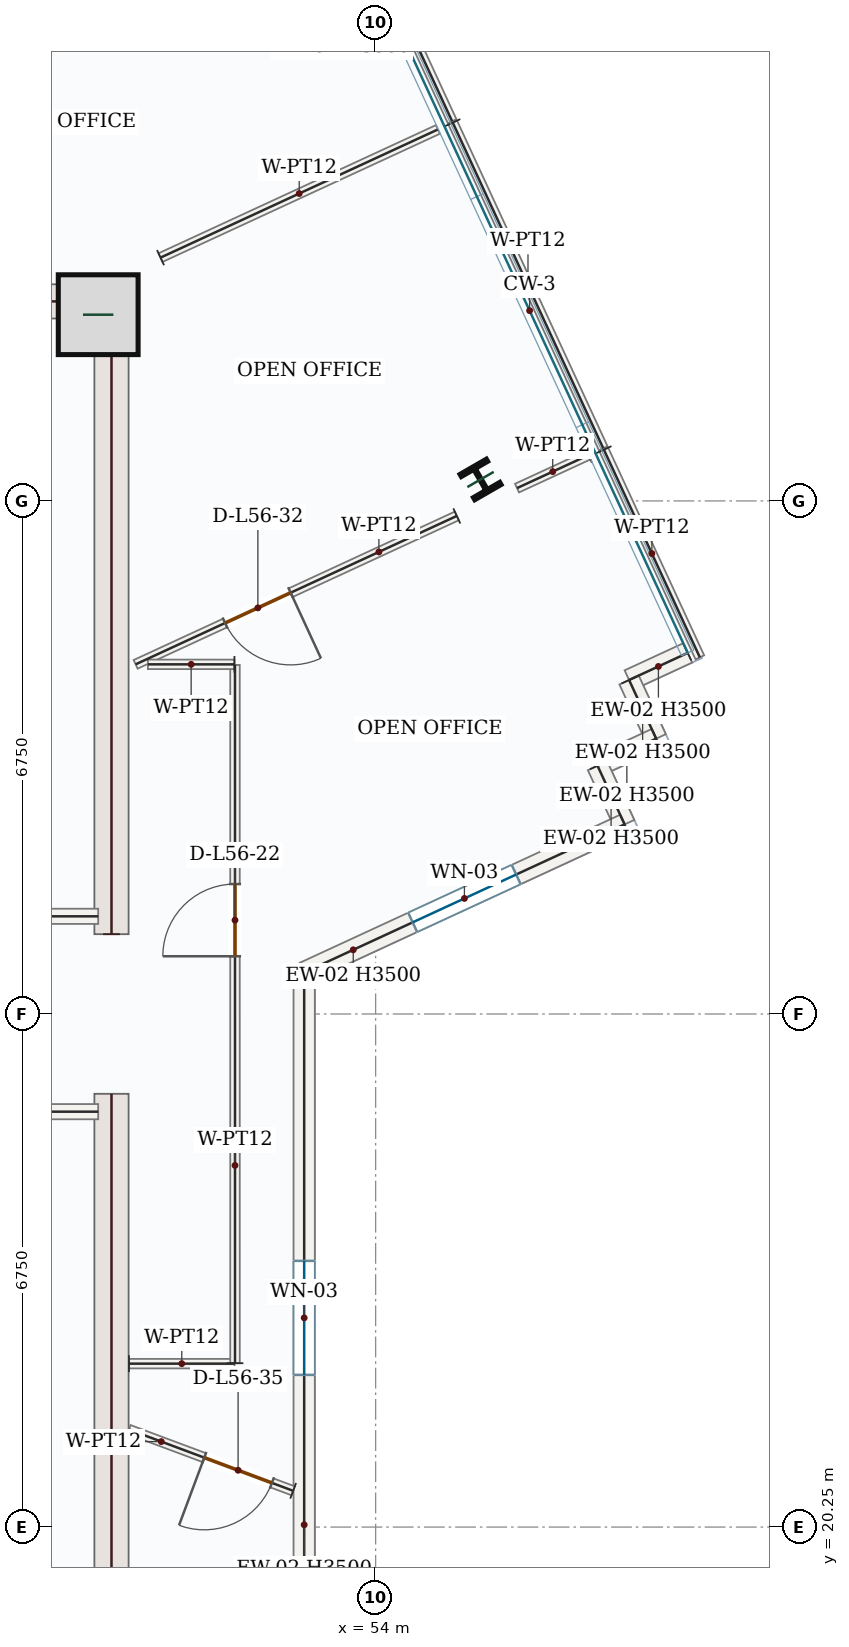
"""IFC4 building model, lengths in metres.
Left out: names, types, materials, properties, quantities, classifications, styles, units other than length and angle.
Written with IfcOpenShell. Run it as: python <this file> out.ifc"""

import sys

from ifc_helpers import new_model, si_unit, direction, frame, frame_2d, origin, origin_2d, place, context, subcontext, project, spatial, rectangle, i_section, extrude, source, transform, mapped, element, fill, save


model = new_model("IFC4")
c1 = context("Model", 3, precision=1e-05, world=origin(), true_north=direction((0.0, 1.0)))
c2 = subcontext(c1, "Body", "Model", "MODEL_VIEW")
j1 = project(units=[si_unit("LENGTHUNIT", "METRE"), si_unit("PLANEANGLEUNIT", "RADIAN")], contexts=[c1])
p1 = place(None, origin())
s1 = spatial("IfcSite", under=j1, at=p1, CompositionType="ELEMENT")
p2 = place(p1, origin())
s2 = spatial("IfcBuilding", under=s1, at=p2, CompositionType="ELEMENT")
p3 = place(p2, frame((0.0, 0.0, 239.1)))
s3 = spatial("IfcBuildingStorey", under=s2, at=p3, CompositionType="ELEMENT", Elevation=239.1)
m1 = source(origin(), c2, "Body", "SweptSolid", [
    extrude(rectangle(XDim=8.55, YDim=0.45, at=frame_2d((4.275, 0.0))), origin(), (0.0, 0.0, 1.0), 3.5),
])
for number, where, z_axis, x_axis in (
    (1, (50.525, 17.4, 0.0), (0.0, 0.0, 1.0), (0.0, 1.0, 0.0)),
    (2, (50.525, 28.05, 0.0), (0.0, 0.0, 1.0), (0.0, 1.0, 0.0)),
):
    element("IfcWall", number, at=place(p3, frame(where, z_axis=z_axis, x_axis=x_axis)), inside=s3, PredefinedType="SHEAR", context=c2, shape_type="MappedRepresentation", body=[
        mapped(m1, transform((0.0, 0.0, 0.0), x_axis=(1.0, 0.0, 0.0), y_axis=(0.0, 1.0, 0.0), z_axis=(0.0, 0.0, 1.0), scale=1.0)),
    ])
m2 = source(origin(), c2, "Body", "SweptSolid", [
    extrude(rectangle(XDim=7.1, YDim=0.45, at=frame_2d((3.55, 0.0))), origin(), (0.0, 0.0, 1.0), 3.5),
])
p4 = place(p3, frame((43.2, 36.375, 0.0), z_axis=(0.0, 0.0, 1.0), x_axis=(1.0, 0.0, 0.0)))
e3 = element("IfcWall", 3, at=p4, inside=s3, PredefinedType="SHEAR", context=c2, shape_type="MappedRepresentation", body=[
    mapped(m2, transform((0.0, 0.0, 0.0), x_axis=(1.0, 0.0, 0.0), y_axis=(0.0, 1.0, 0.0), z_axis=(0.0, 0.0, 1.0), scale=1.0)),
])
m3 = source(origin(), c2, "Body", "SweptSolid", [
    extrude(rectangle(XDim=1.05, YDim=1.05, at=origin_2d()), origin(), (0.0, 0.0, 1.0), 3.75),
])
p5 = place(p3, frame((50.35, 36.2, 0.0), z_axis=(0.0, 0.0, 1.0), x_axis=(1.0, 0.0, 0.0)))
e4 = element("IfcColumn", 4, at=p5, inside=s3, PredefinedType="COLUMN", context=c2, shape_type="MappedRepresentation", body=[
    mapped(m3, transform((0.0, 0.0, 0.0), x_axis=(1.0, 0.0, 0.0), y_axis=(0.0, 1.0, 0.0), z_axis=(0.0, 0.0, 1.0), scale=1.0)),
])
m4 = source(origin(), c2, "Body", "SweptSolid", [
    extrude(i_section(OverallWidth=0.399, OverallDepth=0.386, WebThickness=0.021, FlangeThickness=0.033, FilletRadius=0.018, at=origin_2d()), origin(), (0.0, 0.0, 1.0), 3.75),
])
p6 = place(p3, frame((55.38, 34.032, 0.0), z_axis=(0.0, 0.0, 1.0), x_axis=(0.866025403784, 0.5, 0.0)))
e5 = element("IfcColumn", 5, at=p6, inside=s3, PredefinedType="COLUMN", context=c2, shape_type="MappedRepresentation", body=[
    mapped(m4, transform((0.0, 0.0, 0.0), x_axis=(1.0, 0.0, 0.0), y_axis=(0.0, 1.0, 0.0), z_axis=(0.0, 0.0, 1.0), scale=1.0)),
])
p7 = place(p3, frame((46.655, 39.26, 0.0), z_axis=(0.0, 0.0, 1.0), x_axis=(0.907767275269, 0.419474163627, 0.0)))
e6 = element("IfcWall", 6, at=p7, inside=s3, PredefinedType="SOLIDWALL", context=c2, shape_type="SweptSolid", body=[
    extrude(rectangle(XDim=5.545, YDim=0.28, at=frame_2d((2.772, 0.0))), origin(), (0.0, 0.0, 1.0), 3.5),
])
p8 = place(p7, frame((2.022, 0.0, 0.85)))
e7 = element("IfcOpeningElement", 7, at=p8, cuts=e6, PredefinedType="OPENING", context=c2, shape_type="SweptSolid", body=[
    extrude(rectangle(XDim=1.5, YDim=1.5, at=frame_2d((0.75, 0.75))), frame((0.0, 0.15, 0.0), z_axis=(0.0, -1.0, 0.0), x_axis=(1.0, 0.0, 0.0)), (0.0, 0.0, 1.0), 0.3),
])
m5 = source(origin(), c2, "Body", "SweptSolid", [
    extrude(rectangle(XDim=0.85, YDim=0.28, at=frame_2d((0.425, 0.0))), origin(), (0.0, 0.0, 1.0), 3.5),
])
for number, where, z_axis, x_axis in (
    (8, (58.106, 31.75, 0.0), (0.0, 0.0, 1.0), (-0.908, -0.419, 0.0)),
    (9, (57.334, 31.394, 0.0), (0.0, 0.0, 1.0), (0.419, -0.908, 0.0)),
):
    element("IfcWall", number, at=place(p3, frame(where, z_axis=z_axis, x_axis=x_axis)), inside=s3, PredefinedType="SOLIDWALL", context=c2, shape_type="MappedRepresentation", body=[
        mapped(m5, transform((0.0, 0.0, 0.0), x_axis=(1.0, 0.0, 0.0), y_axis=(0.0, 1.0, 0.0), z_axis=(0.0, 0.0, 1.0), scale=1.0)),
    ])
m6 = source(origin(), c2, "Body", "SweptSolid", [
    extrude(rectangle(XDim=0.85, YDim=0.28, at=frame_2d((0.425, 0.0))), origin(), (0.0, 0.0, 1.0), 3.5),
])
for number, where, z_axis, x_axis in (
    (10, (57.691, 30.622, 0.0), (0.0, 0.0, 1.0), (-0.908, -0.419, 0.0)),
    (11, (56.919, 30.266, 0.0), (0.0, 0.0, 1.0), (0.419, -0.908, 0.0)),
):
    element("IfcWall", number, at=place(p3, frame(where, z_axis=z_axis, x_axis=x_axis)), inside=s3, PredefinedType="SOLIDWALL", context=c2, shape_type="MappedRepresentation", body=[
        mapped(m6, transform((0.0, 0.0, 0.0), x_axis=(1.0, 0.0, 0.0), y_axis=(0.0, 1.0, 0.0), z_axis=(0.0, 0.0, 1.0), scale=1.0)),
    ])
p9 = place(p3, frame((57.276, 29.494, 0.0), z_axis=(0.0, 0.0, 1.0), x_axis=(-0.907756183213, -0.419498166669, 0.0)))
e12 = element("IfcWall", 12, at=p9, inside=s3, PredefinedType="SOLIDWALL", context=c2, shape_type="SweptSolid", body=[
    extrude(rectangle(XDim=4.644, YDim=0.28, at=frame_2d((2.322, 0.0))), origin(), (0.0, 0.0, 1.0), 3.5),
])
p10 = place(p9, frame((1.572, 0.0, 0.85)))
e13 = element("IfcOpeningElement", 13, at=p10, cuts=e12, PredefinedType="OPENING", context=c2, shape_type="SweptSolid", body=[
    extrude(rectangle(XDim=1.5, YDim=1.5, at=frame_2d((0.75, 0.75))), frame((0.0, 0.15, 0.0), z_axis=(0.0, -1.0, 0.0), x_axis=(1.0, 0.0, 0.0)), (0.0, 0.0, 1.0), 0.3),
])
p11 = place(p3, frame((53.06, 27.546, 0.0), z_axis=(0.0, 0.0, 1.0), x_axis=(0.0, -1.0, 0.0)))
e14 = element("IfcWall", 14, at=p11, inside=s3, PredefinedType="SOLIDWALL", context=c2, shape_type="SweptSolid", body=[
    extrude(rectangle(XDim=9.088, YDim=0.28, at=frame_2d((4.544, 0.0))), origin(), (0.0, 0.0, 1.0), 3.5),
])
p12 = place(p11, frame((3.794, 0.0, 0.85)))
e15 = element("IfcOpeningElement", 15, at=p12, cuts=e14, PredefinedType="OPENING", context=c2, shape_type="SweptSolid", body=[
    extrude(rectangle(XDim=1.5, YDim=1.5, at=frame_2d((0.75, 0.75))), frame((0.0, 0.15, 0.0), z_axis=(0.0, -1.0, 0.0), x_axis=(1.0, 0.0, 0.0)), (0.0, 0.0, 1.0), 0.3),
])
m7 = source(origin(), c2, "Body", "SweptSolid", [
    extrude(rectangle(XDim=4.25, YDim=0.2, at=frame_2d((2.125, 0.0))), origin(), (0.0, 0.0, 1.0), 3.5),
])
for number, where, z_axis, x_axis in (
    (16, (46.1, 25.715, 0.0), (0.0, 0.0, 1.0), (1.0, 0.0, 0.0)),
    (17, (46.1, 28.285, 0.0), (0.0, 0.0, 1.0), (1.0, 0.0, 0.0)),
):
    element("IfcWall", number, at=place(p3, frame(where, z_axis=z_axis, x_axis=x_axis)), inside=s3, PredefinedType="SOLIDWALL", context=c2, shape_type="MappedRepresentation", body=[
        mapped(m7, transform((0.0, 0.0, 0.0), x_axis=(1.0, 0.0, 0.0), y_axis=(0.0, 1.0, 0.0), z_axis=(0.0, 0.0, 1.0), scale=1.0)),
    ])
m8 = source(origin(), c2, "Body", "SweptSolid", [
    extrude(rectangle(XDim=4.02, YDim=0.125, at=frame_2d((2.01, 0.0))), origin(), (0.0, 0.0, 1.0), 3.5),
])
p13 = place(p3, frame((51.17, 36.951, 0.0), z_axis=(0.0, 0.0, 1.0), x_axis=(0.907776222313, 0.419454801145, 0.0)))
e18 = element("IfcWall", 18, at=p13, inside=s3, PredefinedType="PARTITIONING", context=c2, shape_type="MappedRepresentation", body=[
    mapped(m8, transform((0.0, 0.0, 0.0), x_axis=(1.0, 0.0, 0.0), y_axis=(0.0, 1.0, 0.0), z_axis=(0.0, 0.0, 1.0), scale=1.0)),
])
m9 = source(origin(), c2, "Body", "SweptSolid", [
    extrude(rectangle(XDim=4.72, YDim=0.125, at=frame_2d((2.36, 0.0))), origin(), (0.0, 0.0, 1.0), 3.5),
])
p14 = place(p3, frame((55.015, 38.727, 0.0), z_axis=(0.0, 0.0, 1.0), x_axis=(0.419422223592, -0.907791274665, 0.0)))
e19 = element("IfcWall", 19, at=p14, inside=s3, PredefinedType="PARTITIONING", context=c2, shape_type="MappedRepresentation", body=[
    mapped(m9, transform((0.0, 0.0, 0.0), x_axis=(1.0, 0.0, 0.0), y_axis=(0.0, 1.0, 0.0), z_axis=(0.0, 0.0, 1.0), scale=1.0)),
])
m10 = source(origin(), c2, "Body", "SweptSolid", [
    extrude(rectangle(XDim=1.034, YDim=0.125, at=frame_2d((0.517, 0.0))), origin(), (0.0, 0.0, 1.0), 3.5),
])
p15 = place(p3, frame((56.799, 34.352, 0.0), z_axis=(0.0, 0.0, 1.0), x_axis=(-0.907786599617, -0.419432342049, 0.0)))
e20 = element("IfcWall", 20, at=p15, inside=s3, PredefinedType="PARTITIONING", context=c2, shape_type="MappedRepresentation", body=[
    mapped(m10, transform((0.0, 0.0, 0.0), x_axis=(1.0, 0.0, 0.0), y_axis=(0.0, 1.0, 0.0), z_axis=(0.0, 0.0, 1.0), scale=1.0)),
])
p16 = place(p3, frame((55.068, 33.552, 0.0), z_axis=(0.0, 0.0, 1.0), x_axis=(-0.90779658515, -0.419410729465, 0.0)))
e21 = element("IfcWall", 21, at=p16, inside=s3, PredefinedType="PARTITIONING", context=c2, shape_type="SweptSolid", body=[
    extrude(rectangle(XDim=4.655, YDim=0.125, at=frame_2d((2.327, 0.0))), origin(), (0.0, 0.0, 1.0), 3.5),
])
p17 = place(p16, frame((2.408, 0.0, 0.0)))
e22 = element("IfcOpeningElement", 22, at=p17, cuts=e21, PredefinedType="OPENING", context=c2, shape_type="SweptSolid", body=[
    extrude(rectangle(XDim=0.95, YDim=2.15, at=frame_2d((0.475, 1.075))), frame((0.0, 0.073, 0.0), z_axis=(0.0, -1.0, 0.0), x_axis=(1.0, 0.0, 0.0)), (0.0, 0.0, 1.0), 0.145),
])
m11 = source(origin(), c2, "Body", "SweptSolid", [
    extrude(rectangle(XDim=1.389, YDim=0.125, at=frame_2d((0.695, 0.0))), origin(), (0.0, 0.0, 1.0), 3.5),
])
p18 = place(p3, frame((50.755, 22.4, 0.0), z_axis=(0.0, 0.0, 1.0), x_axis=(1.0, 0.0, 0.0)))
e23 = element("IfcWall", 23, at=p18, inside=s3, PredefinedType="PARTITIONING", context=c2, shape_type="MappedRepresentation", body=[
    mapped(m11, transform((0.0, 0.0, 0.0), x_axis=(1.0, 0.0, 0.0), y_axis=(0.0, 1.0, 0.0), z_axis=(0.0, 0.0, 1.0), scale=1.0)),
])
p19 = place(p3, frame((52.15, 22.406, 0.0), z_axis=(0.0, 0.0, 1.0), x_axis=(-2.657666e-05, 0.999999999647, 0.0)))
e24 = element("IfcWall", 24, at=p19, inside=s3, PredefinedType="PARTITIONING", context=c2, shape_type="SweptSolid", body=[
    extrude(rectangle(XDim=9.186, YDim=0.125, at=frame_2d((4.593, 0.0))), origin(), (0.0, 0.0, 1.0), 3.5),
])
p20 = place(p19, frame((5.354, 0.0, 0.0)))
e25 = element("IfcOpeningElement", 25, at=p20, cuts=e24, PredefinedType="OPENING", context=c2, shape_type="SweptSolid", body=[
    extrude(rectangle(XDim=0.95, YDim=2.15, at=frame_2d((0.475, 1.075))), frame((0.0, 0.073, 0.0), z_axis=(0.0, -1.0, 0.0), x_axis=(1.0, 0.0, 0.0)), (0.0, 0.0, 1.0), 0.145),
])
m12 = source(origin(), c2, "Body", "SweptSolid", [
    extrude(rectangle(XDim=1.139, YDim=0.125, at=frame_2d((0.569, 0.0))), origin(), (0.0, 0.0, 1.0), 3.5),
])
p21 = place(p3, frame((52.142, 31.6, 0.0), z_axis=(0.0, 0.0, 1.0), x_axis=(-0.999999908058, 0.000428816427, 0.0)))
e26 = element("IfcWall", 26, at=p21, inside=s3, PredefinedType="PARTITIONING", context=c2, shape_type="MappedRepresentation", body=[
    mapped(m12, transform((0.0, 0.0, 0.0), x_axis=(1.0, 0.0, 0.0), y_axis=(0.0, 1.0, 0.0), z_axis=(0.0, 0.0, 1.0), scale=1.0)),
])
m13 = source(origin(), c2, "Body", "SweptSolid", [
    extrude(rectangle(XDim=3.01, YDim=0.125, at=frame_2d((1.505, 0.0))), origin(), (0.0, 0.0, 1.0), 3.5),
])
p22 = place(p3, frame((57.003, 34.424, 0.0), z_axis=(0.0, 0.0, 1.0), x_axis=(0.419490178077, -0.90775987491, 0.0)))
e27 = element("IfcWall", 27, at=p22, inside=s3, PredefinedType="PARTITIONING", context=c2, shape_type="MappedRepresentation", body=[
    mapped(m13, transform((0.0, 0.0, 0.0), x_axis=(1.0, 0.0, 0.0), y_axis=(0.0, 1.0, 0.0), z_axis=(0.0, 0.0, 1.0), scale=1.0)),
])
p23 = place(p3, frame((52.915, 20.727, 0.0), z_axis=(0.0, 0.0, 1.0), x_axis=(-0.936884992217, 0.349637685839, 0.0)))
e28 = element("IfcWall", 28, at=p23, inside=s3, PredefinedType="PARTITIONING", context=c2, shape_type="SweptSolid", body=[
    extrude(rectangle(XDim=2.306, YDim=0.125, at=frame_2d((1.153, 0.0))), origin(), (0.0, 0.0, 1.0), 3.5),
])
p24 = place(p23, frame((0.298, 0.0, 0.0)))
e29 = element("IfcOpeningElement", 29, at=p24, cuts=e28, PredefinedType="OPENING", context=c2, shape_type="SweptSolid", body=[
    extrude(rectangle(XDim=0.95, YDim=2.15, at=frame_2d((0.475, 1.075))), frame((0.0, 0.073, 0.0), z_axis=(0.0, -1.0, 0.0), x_axis=(1.0, 0.0, 0.0)), (0.0, 0.0, 1.0), 0.145),
])
m14 = source(origin(), c2, "Body", "SweptSolid", [
    extrude(rectangle(XDim=2.39, YDim=0.125, at=frame_2d((1.195, 0.0))), origin(), (0.0, 0.0, 1.0), 3.5),
])
p25 = place(p3, frame((54.004, 40.915, 0.0), z_axis=(0.0, 0.0, 1.0), x_axis=(0.419459790898, -0.907773916688, 0.0)))
e30 = element("IfcWall", 30, at=p25, inside=s3, PredefinedType="PARTITIONING", context=c2, shape_type="MappedRepresentation", body=[
    mapped(m14, transform((0.0, 0.0, 0.0), x_axis=(1.0, 0.0, 0.0), y_axis=(0.0, 1.0, 0.0), z_axis=(0.0, 0.0, 1.0), scale=1.0)),
])
m15 = source(origin(), c2, "Body", "SweptSolid", [
    extrude(rectangle(XDim=1.5, YDim=1.5, at=frame_2d((0.75, 0.75))), frame((0.0, 0.03, 0.0), z_axis=(0.0, -1.0, 0.0), x_axis=(1.0, 0.0, 0.0)), (0.0, 0.0, 1.0), 0.06),
])
p26 = place(p10, origin())
e31 = element("IfcWindow", 31, at=p26, inside=s3, PartitioningType="SINGLE_PANEL", PredefinedType="WINDOW", context=c2, shape_type="MappedRepresentation", body=[
    mapped(m15, transform((0.0, 0.0, 0.0), x_axis=(1.0, 0.0, 0.0), y_axis=(0.0, 1.0, 0.0), z_axis=(0.0, 0.0, 1.0), scale=1.0)),
])
fill(e13, e31)
p27 = place(p12, origin())
e32 = element("IfcWindow", 32, at=p27, inside=s3, PartitioningType="SINGLE_PANEL", PredefinedType="WINDOW", context=c2, shape_type="MappedRepresentation", body=[
    mapped(m15, transform((0.0, 0.0, 0.0), x_axis=(1.0, 0.0, 0.0), y_axis=(0.0, 1.0, 0.0), z_axis=(0.0, 0.0, 1.0), scale=1.0)),
])
fill(e15, e32)
m16 = source(origin(), c2, "Body", "SweptSolid", [
    extrude(rectangle(XDim=0.95, YDim=2.15, at=frame_2d((0.475, 1.075))), frame((0.0, 0.025, 0.0), z_axis=(0.0, -1.0, 0.0), x_axis=(1.0, 0.0, 0.0)), (0.0, 0.0, 1.0), 0.05),
])
p28 = place(p20, origin())
e33 = element("IfcDoor", 33, at=p28, inside=s3, OperationType="SINGLE_SWING_LEFT", PredefinedType="DOOR", context=c2, shape_type="MappedRepresentation", body=[
    mapped(m16, transform((0.0, 0.0, 0.0), x_axis=(1.0, 0.0, 0.0), y_axis=(0.0, 1.0, 0.0), z_axis=(0.0, 0.0, 1.0), scale=1.0)),
])
fill(e25, e33)
p29 = place(p17, origin())
e34 = element("IfcDoor", 34, at=p29, inside=s3, OperationType="SINGLE_SWING_LEFT", PredefinedType="DOOR", context=c2, shape_type="MappedRepresentation", body=[
    mapped(m16, transform((0.0, 0.0, 0.0), x_axis=(1.0, 0.0, 0.0), y_axis=(0.0, 1.0, 0.0), z_axis=(0.0, 0.0, 1.0), scale=1.0)),
])
fill(e22, e34)
p30 = place(p24, origin())
e35 = element("IfcDoor", 35, at=p30, inside=s3, OperationType="SINGLE_SWING_RIGHT", PredefinedType="DOOR", context=c2, shape_type="MappedRepresentation", body=[
    mapped(m16, transform((0.0, 0.0, 0.0), x_axis=(1.0, 0.0, 0.0), y_axis=(0.0, 1.0, 0.0), z_axis=(0.0, 0.0, 1.0), scale=1.0)),
])
fill(e29, e35)
save(model, sys.argv[1])
